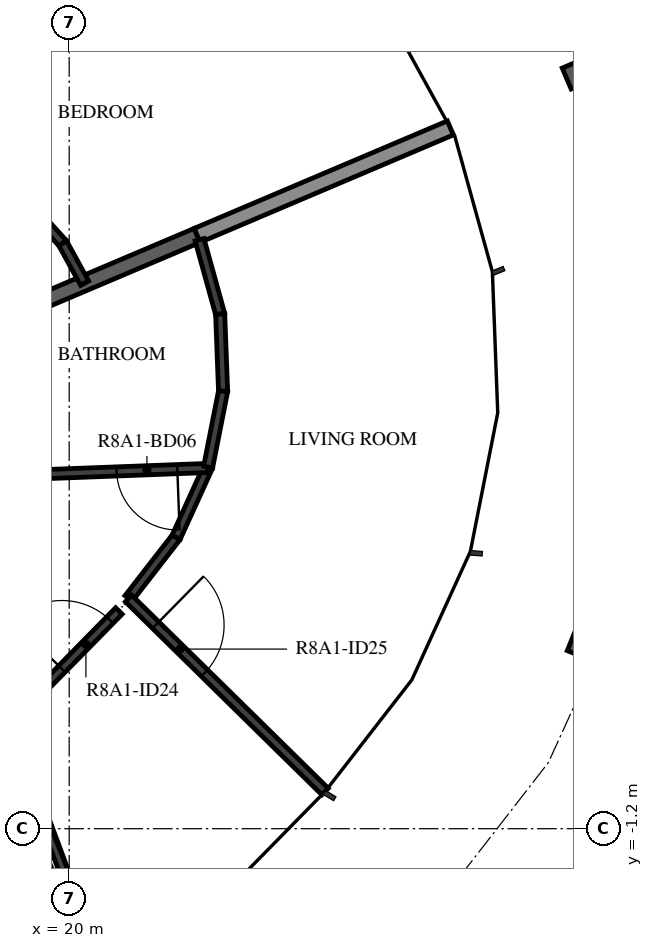
"""IFC4 building model, lengths in metres.
Left out: names, types, materials, properties, quantities, classifications, styles, units other than length and angle.
Written with IfcOpenShell. Run it as: python <this file> out.ifc"""

import sys

from ifc_helpers import new_model, si_unit, direction, frame, frame_2d, origin, origin_2d, place, context, subcontext, project, spatial, rectangle, i_section, extrude, element, fill, save


model = new_model("IFC4")
c1 = context("Model", 3, precision=1e-05, world=origin(), true_north=direction((0.0, 1.0)))
c2 = subcontext(c1, "Body", "Model", "MODEL_VIEW")
j1 = project(units=[si_unit("LENGTHUNIT", "METRE"), si_unit("PLANEANGLEUNIT", "RADIAN")], contexts=[c1])
p1 = place(None, origin())
s1 = spatial("IfcSite", under=j1, at=p1, CompositionType="ELEMENT")
p2 = place(p1, origin())
s2 = spatial("IfcBuilding", under=s1, at=p2, CompositionType="ELEMENT")
p3 = place(p2, frame((0.0, 0.0, 301.7)))
s3 = spatial("IfcBuildingStorey", under=s2, at=p3, CompositionType="ELEMENT", Elevation=301.7)
for number, where, z_axis, x_axis in (
    (1, (27.026, 1.113, -0.38), (0.0, 0.0, 1.0), (-0.375, -0.927, 0.0)),
    (2, (26.96, 8.845, -0.38), (0.0, 0.0, 1.0), (0.391, -0.92, 0.0)),
):
    element("IfcColumn", number, at=place(p3, frame(where, z_axis=z_axis, x_axis=x_axis)), inside=s3, PredefinedType="COLUMN", context=c2, shape_type="SweptSolid", body=[
        extrude(i_section(OverallWidth=0.3, OverallDepth=0.9, WebThickness=0.019, FlangeThickness=0.035, FilletRadius=0.03, at=origin_2d()), origin(), (0.0, 0.0, 1.0), 3.5),
    ])
p4 = place(p3, frame((19.113, 5.514, 0.0), z_axis=(0.0, 0.0, 1.0), x_axis=(0.92047794988, 0.390794503268, 0.0)))
e3 = element("IfcWall", 3, at=p4, inside=s3, PredefinedType="STANDARD", context=c2, shape_type="SweptSolid", body=[
    extrude(rectangle(XDim=2.793, YDim=0.2, at=frame_2d((1.396, 0.0))), origin(), (0.0, 0.0, 1.0), 3.12),
])
p5 = place(p3, frame((21.684, 6.605, 0.0), z_axis=(0.0, 0.0, 1.0), x_axis=(0.920517820403, 0.390700578859, 0.0)))
e4 = element("IfcWall", 4, at=p5, inside=s3, PredefinedType="STANDARD", context=c2, shape_type="SweptSolid", body=[
    extrude(rectangle(XDim=3.619, YDim=0.2, at=frame_2d((1.809, 0.0))), origin(), (0.0, 0.0, 1.0), 2.73),
])
p6 = place(p3, frame((20.203, 5.977, 0.0), z_axis=(0.0, 0.0, 1.0), x_axis=(-0.482261544721, 0.876027284098, 0.0)))
e5 = element("IfcWall", 5, at=p6, inside=s3, PredefinedType="PARTITIONING", context=c2, shape_type="SweptSolid", body=[
    extrude(rectangle(XDim=0.601, YDim=0.12, at=frame_2d((0.301, 0.0))), origin(), (0.0, 0.0, 1.0), 3.12),
])
p7 = place(p3, frame((19.913, 6.504, 0.0), z_axis=(0.0, 0.0, 1.0), x_axis=(-0.671251836621, 0.741229365198, 0.0)))
e6 = element("IfcWall", 6, at=p7, inside=s3, PredefinedType="PARTITIONING", context=c2, shape_type="SweptSolid", body=[
    extrude(rectangle(XDim=0.642, YDim=0.12, at=frame_2d((0.321, 0.0))), origin(), (0.0, 0.0, 1.0), 3.12),
])
p8 = place(p3, frame((23.225, 10.593, 0.0), z_axis=(0.0, 0.0, 1.0), x_axis=(-0.963409492722, -0.268033858559, 0.0)))
e7 = element("IfcWall", 7, at=p8, inside=s3, PredefinedType="PARTITIONING", context=c2, shape_type="SweptSolid", body=[
    extrude(rectangle(XDim=8.2, YDim=0.12, at=frame_2d((4.1, 0.0))), origin(), (0.0, 0.0, 1.0), 3.12),
])
p9 = place(p8, frame((0.5, 0.0, 0.0)))
e8 = element("IfcOpeningElement", 8, at=p9, cuts=e7, PredefinedType="OPENING", context=c2, shape_type="SweptSolid", body=[
    extrude(rectangle(XDim=0.9, YDim=2.1, at=frame_2d((0.45, 1.05))), frame((0.0, 0.07, 0.0), z_axis=(0.0, -1.0, 0.0), x_axis=(1.0, 0.0, 0.0)), (0.0, 0.0, 1.0), 0.14),
])
p10 = place(p3, frame((20.59, -3.537, 0.0), z_axis=(0.0, 0.0, 1.0), x_axis=(-0.348621180513, 0.937263715556, 0.0)))
e9 = element("IfcWall", 9, at=p10, inside=s3, PredefinedType="PARTITIONING", context=c2, shape_type="SweptSolid", body=[
    extrude(rectangle(XDim=3.413, YDim=0.12, at=frame_2d((1.706, 0.0))), origin(), (0.0, 0.0, 1.0), 3.12),
])
p11 = place(p10, frame((0.32, 0.0, 0.0)))
e10 = element("IfcOpeningElement", 10, at=p11, cuts=e9, PredefinedType="OPENING", context=c2, shape_type="SweptSolid", body=[
    extrude(rectangle(XDim=0.9, YDim=2.1, at=frame_2d((0.45, 1.05))), frame((0.0, 0.07, 0.0), z_axis=(0.0, -1.0, 0.0), x_axis=(1.0, 0.0, 0.0)), (0.0, 0.0, 1.0), 0.14),
])
p12 = place(p3, frame((20.781, 1.829, 0.0), z_axis=(0.0, 0.0, 1.0), x_axis=(0.613326972183, 0.789829111386, 0.0)))
e11 = element("IfcWall", 11, at=p12, inside=s3, PredefinedType="PARTITIONING", context=c2, shape_type="SweptSolid", body=[
    extrude(rectangle(XDim=1.02, YDim=0.12, at=frame_2d((0.51, 0.0))), origin(), (0.0, 0.0, 1.0), 3.12),
])
p13 = place(p3, frame((21.406, 2.634, 0.0), z_axis=(0.0, 0.0, 1.0), x_axis=(0.414726005229, 0.909946339399, 0.0)))
e12 = element("IfcWall", 12, at=p13, inside=s3, PredefinedType="PARTITIONING", context=c2, shape_type="SweptSolid", body=[
    extrude(rectangle(XDim=1.016, YDim=0.12, at=frame_2d((0.508, 0.0))), origin(), (0.0, 0.0, 1.0), 3.12),
])
p14 = place(p3, frame((21.822, 3.545, 0.0), z_axis=(0.0, 0.0, 1.0), x_axis=(-0.999286397149, -0.037771635816, 0.0)))
e13 = element("IfcWall", 13, at=p14, inside=s3, PredefinedType="PARTITIONING", context=c2, shape_type="SweptSolid", body=[
    extrude(rectangle(XDim=2.424, YDim=0.12, at=frame_2d((1.212, 0.0))), origin(), (0.0, 0.0, 1.0), 3.12),
])
p15 = place(p14, frame((0.4, 0.0, 0.0)))
e14 = element("IfcOpeningElement", 14, at=p15, cuts=e13, PredefinedType="OPENING", context=c2, shape_type="SweptSolid", body=[
    extrude(rectangle(XDim=0.8, YDim=2.1, at=frame_2d((0.4, 1.05))), frame((0.0, 0.07, 0.0), z_axis=(0.0, -1.0, 0.0), x_axis=(1.0, 0.0, 0.0)), (0.0, 0.0, 1.0), 0.14),
])
p16 = place(p3, frame((19.4, 0.389, 0.0), z_axis=(0.0, 0.0, 1.0), x_axis=(0.700870484553, 0.713288555833, 0.0)))
e15 = element("IfcWall", 15, at=p16, inside=s3, PredefinedType="PARTITIONING", context=c2, shape_type="SweptSolid", body=[
    extrude(rectangle(XDim=1.789, YDim=0.12, at=frame_2d((0.895, 0.0))), origin(), (0.0, 0.0, 1.0), 3.12),
])
p17 = place(p16, frame((0.72, 0.0, 0.0)))
e16 = element("IfcOpeningElement", 16, at=p17, cuts=e15, PredefinedType="OPENING", context=c2, shape_type="SweptSolid", body=[
    extrude(rectangle(XDim=0.9, YDim=2.1, at=frame_2d((0.45, 1.05))), frame((0.0, 0.07, 0.0), z_axis=(0.0, -1.0, 0.0), x_axis=(1.0, 0.0, 0.0)), (0.0, 0.0, 1.0), 0.14),
])
for number, where, z_axis, x_axis in (
    (17, (21.715, 6.549, 0.0), (0.0, 0.0, 1.0), (0.267, -0.964, 0.0)),
    (18, (21.986, 5.57, 0.0), (0.0, 0.0, 1.0), (0.038, -0.999, 0.0)),
    (19, (22.025, 4.555, 0.0), (0.0, 0.0, 1.0), (-0.194, -0.981, 0.0)),
):
    element("IfcWall", number, at=place(p3, frame(where, z_axis=z_axis, x_axis=x_axis)), inside=s3, PredefinedType="PARTITIONING", context=c2, shape_type="SweptSolid", body=[
        extrude(rectangle(XDim=1.016, YDim=0.12, at=frame_2d((0.508, 0.0))), origin(), (0.0, 0.0, 1.0), 3.12),
    ])
p18 = place(p3, frame((20.781, 1.829, 0.0), z_axis=(0.0, 0.0, 1.0), x_axis=(0.713277344744, -0.700881894099, 0.0)))
e20 = element("IfcWall", 20, at=p18, inside=s3, PredefinedType="PARTITIONING", context=c2, shape_type="SweptSolid", body=[
    extrude(rectangle(XDim=3.624, YDim=0.12, at=frame_2d((1.812, 0.0))), origin(), (0.0, 0.0, 1.0), 3.12),
])
p19 = place(p18, frame((0.5, 0.0, 0.0)))
e21 = element("IfcOpeningElement", 21, at=p19, cuts=e20, PredefinedType="OPENING", context=c2, shape_type="SweptSolid", body=[
    extrude(rectangle(XDim=0.9, YDim=2.1, at=frame_2d((0.45, 1.05))), frame((0.0, 0.07, 0.0), z_axis=(0.0, -1.0, 0.0), x_axis=(1.0, 0.0, 0.0)), (0.0, 0.0, 1.0), 0.14),
])
p20 = place(p17, origin())
e22 = element("IfcDoor", 22, at=p20, inside=s3, OperationType="SINGLE_SWING_LEFT", PredefinedType="DOOR", context=c2, shape_type="SweptSolid", body=[
    extrude(rectangle(XDim=0.9, YDim=2.1, at=frame_2d((0.45, 1.05))), frame((0.0, 0.025, 0.0), z_axis=(0.0, -1.0, 0.0), x_axis=(1.0, 0.0, 0.0)), (0.0, 0.0, 1.0), 0.05),
])
fill(e16, e22)
p21 = place(p15, origin())
e23 = element("IfcDoor", 23, at=p21, inside=s3, OperationType="SINGLE_SWING_RIGHT", PredefinedType="DOOR", context=c2, shape_type="SweptSolid", body=[
    extrude(rectangle(XDim=0.8, YDim=2.1, at=frame_2d((0.4, 1.05))), frame((0.0, 0.025, 0.0), z_axis=(0.0, -1.0, 0.0), x_axis=(1.0, 0.0, 0.0)), (0.0, 0.0, 1.0), 0.05),
])
fill(e14, e23)
p22 = place(p19, origin())
e24 = element("IfcDoor", 24, at=p22, inside=s3, OperationType="SINGLE_SWING_RIGHT", PredefinedType="DOOR", context=c2, shape_type="SweptSolid", body=[
    extrude(rectangle(XDim=0.9, YDim=2.1, at=frame_2d((0.45, 1.05))), frame((0.0, 0.025, 0.0), z_axis=(0.0, -1.0, 0.0), x_axis=(1.0, 0.0, 0.0)), (0.0, 0.0, 1.0), 0.05),
])
fill(e21, e24)
save(model, sys.argv[1])
